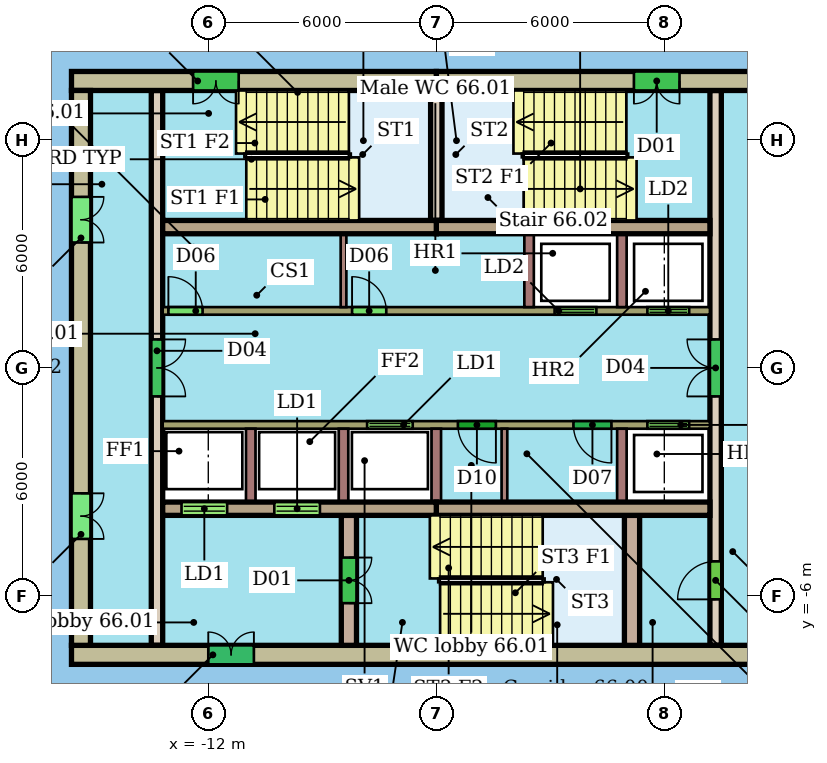
"""IFC4 building model, lengths in metres.
Left out: names, types, materials, properties, quantities, classifications, styles, units other than length and angle.
Written with IfcOpenShell. Run it as: python <this file> out.ifc"""

import sys

from ifc_helpers import new_model, si_unit, direction, frame, frame_2d, origin, place, context, subcontext, project, spatial, rectangle, extrude, element, fill, save


model = new_model("IFC4")
c1 = context("Model", 3, precision=1e-05, world=origin(), true_north=direction((0.0, 1.0)))
c2 = subcontext(c1, "Body", "Model", "MODEL_VIEW")
j1 = project(units=[si_unit("LENGTHUNIT", "METRE"), si_unit("PLANEANGLEUNIT", "RADIAN")], contexts=[c1])
p1 = place(None, origin())
s1 = spatial("IfcSite", under=j1, at=p1, CompositionType="ELEMENT")
p2 = place(p1, origin())
s2 = spatial("IfcBuilding", under=s1, at=p2, CompositionType="ELEMENT")
p3 = place(p2, frame((0.0, 0.0, 268.5)))
s3 = spatial("IfcBuildingStorey", under=s2, at=p3, CompositionType="ELEMENT", Elevation=268.5)
p4 = place(p3, frame((3.6, 7.55, 0.0), z_axis=(0.0, 0.0, 1.0), x_axis=(-1.0, 0.0, 0.0)))
e1 = element("IfcWall", 1, at=p4, inside=s3, PredefinedType="SHEAR", context=c2, shape_type="SweptSolid", body=[
    extrude(rectangle(XDim=9.6, YDim=0.5, at=frame_2d((4.8, 0.0))), origin(), (0.0, 0.0, 1.0), 3.3),
])
p5 = place(p4, frame((3.2, 0.0, 0.0)))
e2 = element("IfcOpeningElement", 2, at=p5, cuts=e1, PredefinedType="OPENING", context=c2, shape_type="SweptSolid", body=[
    extrude(rectangle(XDim=1.2, YDim=2.1, at=frame_2d((0.6, 1.05))), frame((0.0, 0.26, 0.0), z_axis=(0.0, -1.0, 0.0), x_axis=(1.0, 0.0, 0.0)), (0.0, 0.0, 1.0), 0.52),
])
p6 = place(p3, frame((-6.0, 7.55, 0.0), z_axis=(0.0, 0.0, 1.0), x_axis=(-1.0, 0.0, 0.0)))
e3 = element("IfcWall", 3, at=p6, inside=s3, PredefinedType="SHEAR", context=c2, shape_type="SweptSolid", body=[
    extrude(rectangle(XDim=9.6, YDim=0.5, at=frame_2d((4.8, 0.0))), origin(), (0.0, 0.0, 1.0), 3.3),
])
p7 = place(p6, frame((5.2, 0.0, 0.0)))
e4 = element("IfcOpeningElement", 4, at=p7, cuts=e3, PredefinedType="OPENING", context=c2, shape_type="SweptSolid", body=[
    extrude(rectangle(XDim=1.2, YDim=2.1, at=frame_2d((0.6, 1.05))), frame((0.0, 0.26, 0.0), z_axis=(0.0, -1.0, 0.0), x_axis=(1.0, 0.0, 0.0)), (0.0, 0.0, 1.0), 0.52),
])
p8 = place(p3, frame((-15.6, -7.55, 0.0), z_axis=(0.0, 0.0, 1.0), x_axis=(1.0, 0.0, 0.0)))
e5 = element("IfcWall", 5, at=p8, inside=s3, PredefinedType="SHEAR", context=c2, shape_type="SweptSolid", body=[
    extrude(rectangle(XDim=19.2, YDim=0.5, at=frame_2d((9.6, 0.0))), origin(), (0.0, 0.0, 1.0), 3.3),
])
p9 = place(p8, frame((3.6, 0.0, 0.0)))
e6 = element("IfcOpeningElement", 6, at=p9, cuts=e5, PredefinedType="OPENING", context=c2, shape_type="SweptSolid", body=[
    extrude(rectangle(XDim=1.2, YDim=2.1, at=frame_2d((0.6, 1.05))), frame((0.0, 0.26, 0.0), z_axis=(0.0, -1.0, 0.0), x_axis=(1.0, 0.0, 0.0)), (0.0, 0.0, 1.0), 0.52),
])
p10 = place(p3, frame((-15.35, 7.3, 0.0), z_axis=(0.0, 0.0, 1.0), x_axis=(0.0, -1.0, 0.0)))
e7 = element("IfcWall", 7, at=p10, inside=s3, PredefinedType="SHEAR", context=c2, shape_type="SweptSolid", body=[
    extrude(rectangle(XDim=14.6, YDim=0.5, at=frame_2d((7.3, 0.0))), origin(), (0.0, 0.0, 1.0), 3.3),
])
p11 = place(p10, frame((10.6, 0.0, 0.0)))
e8 = element("IfcOpeningElement", 8, at=p11, cuts=e7, PredefinedType="OPENING", context=c2, shape_type="SweptSolid", body=[
    extrude(rectangle(XDim=1.2, YDim=2.1, at=frame_2d((0.6, 1.05))), frame((0.0, 0.26, 0.0), z_axis=(0.0, -1.0, 0.0), x_axis=(1.0, 0.0, 0.0)), (0.0, 0.0, 1.0), 0.52),
])
p12 = place(p10, frame((2.8, 0.0, 0.0)))
e9 = element("IfcOpeningElement", 9, at=p12, cuts=e7, PredefinedType="OPENING", context=c2, shape_type="SweptSolid", body=[
    extrude(rectangle(XDim=1.2, YDim=2.1, at=frame_2d((0.6, 1.05))), frame((0.0, 0.26, 0.0), z_axis=(0.0, -1.0, 0.0), x_axis=(1.0, 0.0, 0.0)), (0.0, 0.0, 1.0), 0.52),
])
for number, where, z_axis, x_axis in (
    (10, (-13.2, 3.705, 0.0), (0.0, 0.0, 1.0), (1.0, 0.0, 0.0)),
    (11, (-6.0, 3.705, 0.0), (0.0, 0.0, 1.0), (1.0, 0.0, 0.0)),
):
    element("IfcWall", number, at=place(p3, frame(where, z_axis=z_axis, x_axis=x_axis)), inside=s3, PredefinedType="SHEAR", context=c2, shape_type="SweptSolid", body=[
        extrude(rectangle(XDim=7.2, YDim=0.35, at=frame_2d((3.6, 0.0))), origin(), (0.0, 0.0, 1.0), 3.3),
    ])
p13 = place(p3, frame((-13.2, -3.705, 0.0), z_axis=(0.0, 0.0, 1.0), x_axis=(1.0, 0.0, 0.0)))
e12 = element("IfcWall", 12, at=p13, inside=s3, PredefinedType="SHEAR", context=c2, shape_type="SweptSolid", body=[
    extrude(rectangle(XDim=7.2, YDim=0.35, at=frame_2d((3.6, 0.0))), origin(), (0.0, 0.0, 1.0), 3.3),
])
p14 = place(p13, frame((0.496, 0.0, 0.0)))
e13 = element("IfcOpeningElement", 13, at=p14, cuts=e12, PredefinedType="OPENING", context=c2, shape_type="SweptSolid", body=[
    extrude(rectangle(XDim=1.2, YDim=2.1, at=frame_2d((0.6, 1.05))), frame((0.0, 0.185, 0.0), z_axis=(0.0, -1.0, 0.0), x_axis=(1.0, 0.0, 0.0)), (0.0, 0.0, 1.0), 0.37),
])
p15 = place(p13, frame((2.938, 0.0, 0.0)))
e14 = element("IfcOpeningElement", 14, at=p15, cuts=e12, PredefinedType="OPENING", context=c2, shape_type="SweptSolid", body=[
    extrude(rectangle(XDim=1.2, YDim=2.1, at=frame_2d((0.6, 1.05))), frame((0.0, 0.185, 0.0), z_axis=(0.0, -1.0, 0.0), x_axis=(1.0, 0.0, 0.0)), (0.0, 0.0, 1.0), 0.37),
])
p16 = place(p3, frame((-6.0, -3.705, 0.0), z_axis=(0.0, 0.0, 1.0), x_axis=(1.0, 0.0, 0.0)))
e15 = element("IfcWall", 15, at=p16, inside=s3, PredefinedType="SHEAR", context=c2, shape_type="SweptSolid", body=[
    extrude(rectangle(XDim=7.2, YDim=0.35, at=frame_2d((3.6, 0.0))), origin(), (0.0, 0.0, 1.0), 3.3),
])
p17 = place(p3, frame((-13.35, 7.3, 0.0), z_axis=(0.0, 0.0, 1.0), x_axis=(0.0, -1.0, 0.0)))
e16 = element("IfcWall", 16, at=p17, inside=s3, PredefinedType="SHEAR", context=c2, shape_type="SweptSolid", body=[
    extrude(rectangle(XDim=14.6, YDim=0.3, at=frame_2d((7.3, 0.0))), origin(), (0.0, 0.0, 1.0), 3.3),
])
p18 = place(p17, frame((6.55, 0.0, 0.0)))
e17 = element("IfcOpeningElement", 17, at=p18, cuts=e16, PredefinedType="OPENING", context=c2, shape_type="SweptSolid", body=[
    extrude(rectangle(XDim=1.5, YDim=2.1, at=frame_2d((0.75, 1.05))), frame((0.0, 0.16, 0.0), z_axis=(0.0, -1.0, 0.0), x_axis=(1.0, 0.0, 0.0)), (0.0, 0.0, 1.0), 0.32),
])
p19 = place(p3, frame((1.35, -7.3, 0.0), z_axis=(0.0, 0.0, 1.0), x_axis=(0.0, 1.0, 0.0)))
e18 = element("IfcWall", 18, at=p19, inside=s3, PredefinedType="SHEAR", context=c2, shape_type="SweptSolid", body=[
    extrude(rectangle(XDim=14.6, YDim=0.3, at=frame_2d((7.3, 0.0))), origin(), (0.0, 0.0, 1.0), 3.3),
])
p20 = place(p19, frame((1.21, 0.0, 0.0)))
e19 = element("IfcOpeningElement", 19, at=p20, cuts=e18, PredefinedType="OPENING", context=c2, shape_type="SweptSolid", body=[
    extrude(rectangle(XDim=1.0, YDim=2.1, at=frame_2d((0.5, 1.05))), frame((0.0, 0.16, 0.0), z_axis=(0.0, -1.0, 0.0), x_axis=(1.0, 0.0, 0.0)), (0.0, 0.0, 1.0), 0.32),
])
p21 = place(p19, frame((6.55, 0.0, 0.0)))
e20 = element("IfcOpeningElement", 20, at=p21, cuts=e18, PredefinedType="OPENING", context=c2, shape_type="SweptSolid", body=[
    extrude(rectangle(XDim=1.5, YDim=2.1, at=frame_2d((0.75, 1.05))), frame((0.0, 0.16, 0.0), z_axis=(0.0, -1.0, 0.0), x_axis=(1.0, 0.0, 0.0)), (0.0, 0.0, 1.0), 0.32),
])
p22 = place(p3, frame((-13.2, 1.5, 0.0), z_axis=(0.0, 0.0, 1.0), x_axis=(1.0, 0.0, 0.0)))
e21 = element("IfcWall", 21, at=p22, inside=s3, PredefinedType="SHEAR", context=c2, shape_type="SweptSolid", body=[
    extrude(rectangle(XDim=14.4, YDim=0.2, at=frame_2d((7.2, 0.0))), origin(), (0.0, 0.0, 1.0), 3.3),
])
p23 = place(p22, frame((10.312, 0.0, 0.0)))
e22 = element("IfcOpeningElement", 22, at=p23, cuts=e21, PredefinedType="OPENING", context=c2, shape_type="SweptSolid", body=[
    extrude(rectangle(XDim=1.1, YDim=2.1, at=frame_2d((0.55, 1.05))), frame((0.0, 0.11, 0.0), z_axis=(0.0, -1.0, 0.0), x_axis=(1.0, 0.0, 0.0)), (0.0, 0.0, 1.0), 0.22),
])
p24 = place(p22, frame((12.754, 0.0, 0.0)))
e23 = element("IfcOpeningElement", 23, at=p24, cuts=e21, PredefinedType="OPENING", context=c2, shape_type="SweptSolid", body=[
    extrude(rectangle(XDim=1.1, YDim=2.1, at=frame_2d((0.55, 1.05))), frame((0.0, 0.11, 0.0), z_axis=(0.0, -1.0, 0.0), x_axis=(1.0, 0.0, 0.0)), (0.0, 0.0, 1.0), 0.22),
])
p25 = place(p22, frame((0.15, 0.0, 0.0)))
e24 = element("IfcOpeningElement", 24, at=p25, cuts=e21, PredefinedType="OPENING", context=c2, shape_type="SweptSolid", body=[
    extrude(rectangle(XDim=0.9, YDim=2.1, at=frame_2d((0.45, 1.05))), frame((0.0, 0.11, 0.0), z_axis=(0.0, -1.0, 0.0), x_axis=(1.0, 0.0, 0.0)), (0.0, 0.0, 1.0), 0.22),
])
p26 = place(p22, frame((4.983, 0.0, 0.0)))
e25 = element("IfcOpeningElement", 25, at=p26, cuts=e21, PredefinedType="OPENING", context=c2, shape_type="SweptSolid", body=[
    extrude(rectangle(XDim=0.9, YDim=2.1, at=frame_2d((0.45, 1.05))), frame((0.0, 0.11, 0.0), z_axis=(0.0, -1.0, 0.0), x_axis=(1.0, 0.0, 0.0)), (0.0, 0.0, 1.0), 0.22),
])
p27 = place(p3, frame((1.2, -1.5, 0.0), z_axis=(0.0, 0.0, 1.0), x_axis=(-1.0, 0.0, 0.0)))
e26 = element("IfcWall", 26, at=p27, inside=s3, PredefinedType="SHEAR", context=c2, shape_type="SweptSolid", body=[
    extrude(rectangle(XDim=14.4, YDim=0.2, at=frame_2d((7.2, 0.0))), origin(), (0.0, 0.0, 1.0), 3.3),
])
p28 = place(p27, frame((7.821, 0.0, 0.0)))
e27 = element("IfcOpeningElement", 27, at=p28, cuts=e26, PredefinedType="OPENING", context=c2, shape_type="SweptSolid", body=[
    extrude(rectangle(XDim=1.2, YDim=2.1, at=frame_2d((0.6, 1.05))), frame((0.0, 0.11, 0.0), z_axis=(0.0, -1.0, 0.0), x_axis=(1.0, 0.0, 0.0)), (0.0, 0.0, 1.0), 0.22),
])
p29 = place(p27, frame((0.546, 0.0, 0.0)))
e28 = element("IfcOpeningElement", 28, at=p29, cuts=e26, PredefinedType="OPENING", context=c2, shape_type="SweptSolid", body=[
    extrude(rectangle(XDim=1.1, YDim=2.1, at=frame_2d((0.55, 1.05))), frame((0.0, 0.11, 0.0), z_axis=(0.0, -1.0, 0.0), x_axis=(1.0, 0.0, 0.0)), (0.0, 0.0, 1.0), 0.22),
])
p30 = place(p27, frame((5.632, 0.0, 0.0)))
e29 = element("IfcOpeningElement", 29, at=p30, cuts=e26, PredefinedType="OPENING", context=c2, shape_type="SweptSolid", body=[
    extrude(rectangle(XDim=1.0, YDim=2.1, at=frame_2d((0.5, 1.05))), frame((0.0, 0.11, 0.0), z_axis=(0.0, -1.0, 0.0), x_axis=(1.0, 0.0, 0.0)), (0.0, 0.0, 1.0), 0.22),
])
p31 = place(p27, frame((2.592, 0.0, 0.0)))
e30 = element("IfcOpeningElement", 30, at=p31, cuts=e26, PredefinedType="OPENING", context=c2, shape_type="SweptSolid", body=[
    extrude(rectangle(XDim=1.0, YDim=2.1, at=frame_2d((0.5, 1.05))), frame((0.0, 0.11, 0.0), z_axis=(0.0, -1.0, 0.0), x_axis=(1.0, 0.0, 0.0)), (0.0, 0.0, 1.0), 0.22),
])
p32 = place(p3, frame((-8.3, -3.88, 0.0), z_axis=(0.0, 0.0, 1.0), x_axis=(0.0, -1.0, 0.0)))
e31 = element("IfcWall", 31, at=p32, inside=s3, PredefinedType="SHEAR", context=c2, shape_type="SweptSolid", body=[
    extrude(rectangle(XDim=3.42, YDim=0.4, at=frame_2d((1.71, 0.0))), origin(), (0.0, 0.0, 1.0), 3.3),
])
p33 = place(p32, frame((1.11, 0.0, 0.0)))
e32 = element("IfcOpeningElement", 32, at=p33, cuts=e31, PredefinedType="OPENING", context=c2, shape_type="SweptSolid", body=[
    extrude(rectangle(XDim=1.2, YDim=2.1, at=frame_2d((0.6, 1.05))), frame((0.0, 0.21, 0.0), z_axis=(0.0, -1.0, 0.0), x_axis=(1.0, 0.0, 0.0)), (0.0, 0.0, 1.0), 0.42),
])
p34 = place(p3, frame((-0.85, -3.88, 0.0), z_axis=(0.0, 0.0, 1.0), x_axis=(0.0, -1.0, 0.0)))
e33 = element("IfcWall", 33, at=p34, inside=s3, PredefinedType="SHEAR", context=c2, shape_type="SweptSolid", body=[
    extrude(rectangle(XDim=3.42, YDim=0.4, at=frame_2d((1.71, 0.0))), origin(), (0.0, 0.0, 1.0), 3.3),
])
p35 = place(p3, frame((-6.0, 3.88, 0.0), z_axis=(0.0, 0.0, 1.0), x_axis=(0.0, 1.0, 0.0)))
e34 = element("IfcWall", 34, at=p35, inside=s3, PredefinedType="SHEAR", context=c2, shape_type="SweptSolid", body=[
    extrude(rectangle(XDim=3.42, YDim=0.3, at=frame_2d((1.71, 0.0))), origin(), (0.0, 0.0, 1.0), 3.3),
])
for number, where, z_axis, x_axis in (
    (35, (-3.558, 1.6, 0.0), (0.0, 0.0, 1.0), (0.0, 1.0, 0.0)),
    (36, (-1.117, 1.6, 0.0), (0.0, 0.0, 1.0), (0.0, 1.0, 0.0)),
):
    element("IfcWall", number, at=place(p3, frame(where, z_axis=z_axis, x_axis=x_axis)), inside=s3, PredefinedType="SHEAR", context=c2, shape_type="SweptSolid", body=[
        extrude(rectangle(XDim=1.93, YDim=0.25, at=frame_2d((0.965, 0.0))), origin(), (0.0, 0.0, 1.0), 3.3),
    ])
p36 = place(p3, frame((-8.442, 1.6, 0.0), z_axis=(0.0, 0.0, 1.0), x_axis=(0.0, 1.0, 0.0)))
e37 = element("IfcWall", 37, at=p36, inside=s3, PredefinedType="PARTITIONING", context=c2, shape_type="SweptSolid", body=[
    extrude(rectangle(XDim=1.93, YDim=0.15, at=frame_2d((0.965, 0.0))), origin(), (0.0, 0.0, 1.0), 3.3),
])
for number, where, z_axis, x_axis in (
    (38, (-10.883, -1.6, 0.0), (0.0, 0.0, 1.0), (0.0, -1.0, 0.0)),
    (39, (-8.442, -1.6, 0.0), (0.0, 0.0, 1.0), (0.0, -1.0, 0.0)),
    (40, (-6.0, -1.6, 0.0), (0.0, 0.0, 1.0), (0.0, -1.0, 0.0)),
    (41, (-1.117, -1.6, 0.0), (0.0, 0.0, 1.0), (0.0, -1.0, 0.0)),
):
    element("IfcWall", number, at=place(p3, frame(where, z_axis=z_axis, x_axis=x_axis)), inside=s3, PredefinedType="SHEAR", context=c2, shape_type="SweptSolid", body=[
        extrude(rectangle(XDim=1.93, YDim=0.25, at=frame_2d((0.965, 0.0))), origin(), (0.0, 0.0, 1.0), 3.3),
    ])
p37 = place(p3, frame((-4.207, -1.6, 0.0), z_axis=(0.0, 0.0, 1.0), x_axis=(0.0, -1.0, 0.0)))
e42 = element("IfcWall", 42, at=p37, inside=s3, PredefinedType="PARTITIONING", context=c2, shape_type="SweptSolid", body=[
    extrude(rectangle(XDim=1.93, YDim=0.15, at=frame_2d((0.965, 0.0))), origin(), (0.0, 0.0, 1.0), 3.3),
])
p38 = place(p5, origin())
e43 = element("IfcDoor", 43, at=p38, inside=s3, OperationType="DOUBLE_DOOR_SINGLE_SWING", PredefinedType="NOTDEFINED", context=c2, shape_type="SweptSolid", body=[
    extrude(rectangle(XDim=1.2, YDim=2.1, at=frame_2d((0.6, 1.05))), frame((0.0, 0.025, 0.0), z_axis=(0.0, -1.0, 0.0), x_axis=(1.0, 0.0, 0.0)), (0.0, 0.0, 1.0), 0.05),
])
fill(e2, e43)
p39 = place(p7, origin())
e44 = element("IfcDoor", 44, at=p39, inside=s3, OperationType="DOUBLE_DOOR_SINGLE_SWING", PredefinedType="NOTDEFINED", context=c2, shape_type="SweptSolid", body=[
    extrude(rectangle(XDim=1.2, YDim=2.1, at=frame_2d((0.6, 1.05))), frame((0.0, 0.025, 0.0), z_axis=(0.0, -1.0, 0.0), x_axis=(1.0, 0.0, 0.0)), (0.0, 0.0, 1.0), 0.05),
])
fill(e4, e44)
p40 = place(p9, origin())
e45 = element("IfcDoor", 45, at=p40, inside=s3, OperationType="DOUBLE_DOOR_SINGLE_SWING", PredefinedType="NOTDEFINED", context=c2, shape_type="SweptSolid", body=[
    extrude(rectangle(XDim=1.2, YDim=2.1, at=frame_2d((0.6, 1.05))), frame((0.0, 0.025, 0.0), z_axis=(0.0, -1.0, 0.0), x_axis=(1.0, 0.0, 0.0)), (0.0, 0.0, 1.0), 0.05),
])
fill(e6, e45)
p41 = place(p11, origin())
e46 = element("IfcDoor", 46, at=p41, inside=s3, OperationType="DOUBLE_DOOR_SINGLE_SWING", PredefinedType="NOTDEFINED", context=c2, shape_type="SweptSolid", body=[
    extrude(rectangle(XDim=1.2, YDim=2.1, at=frame_2d((0.6, 1.05))), frame((0.0, 0.025, 0.0), z_axis=(0.0, -1.0, 0.0), x_axis=(1.0, 0.0, 0.0)), (0.0, 0.0, 1.0), 0.05),
])
fill(e8, e46)
p42 = place(p12, origin())
e47 = element("IfcDoor", 47, at=p42, inside=s3, OperationType="DOUBLE_DOOR_SINGLE_SWING", PredefinedType="NOTDEFINED", context=c2, shape_type="SweptSolid", body=[
    extrude(rectangle(XDim=1.2, YDim=2.1, at=frame_2d((0.6, 1.05))), frame((0.0, 0.025, 0.0), z_axis=(0.0, -1.0, 0.0), x_axis=(1.0, 0.0, 0.0)), (0.0, 0.0, 1.0), 0.05),
])
fill(e9, e47)
p43 = place(p14, origin())
e48 = element("IfcDoor", 48, at=p43, inside=s3, OperationType="DOUBLE_DOOR_SLIDING", PredefinedType="NOTDEFINED", context=c2, shape_type="SweptSolid", body=[
    extrude(rectangle(XDim=1.2, YDim=2.1, at=frame_2d((0.6, 1.05))), frame((0.0, 0.025, 0.0), z_axis=(0.0, -1.0, 0.0), x_axis=(1.0, 0.0, 0.0)), (0.0, 0.0, 1.0), 0.05),
])
fill(e13, e48)
p44 = place(p15, origin())
e49 = element("IfcDoor", 49, at=p44, inside=s3, OperationType="DOUBLE_DOOR_SLIDING", PredefinedType="NOTDEFINED", context=c2, shape_type="SweptSolid", body=[
    extrude(rectangle(XDim=1.2, YDim=2.1, at=frame_2d((0.6, 1.05))), frame((0.0, 0.025, 0.0), z_axis=(0.0, -1.0, 0.0), x_axis=(1.0, 0.0, 0.0)), (0.0, 0.0, 1.0), 0.05),
])
fill(e14, e49)
p45 = place(p18, origin())
e50 = element("IfcDoor", 50, at=p45, inside=s3, OperationType="DOUBLE_DOOR_SINGLE_SWING", PredefinedType="NOTDEFINED", context=c2, shape_type="SweptSolid", body=[
    extrude(rectangle(XDim=1.5, YDim=2.1, at=frame_2d((0.75, 1.05))), frame((0.0, 0.025, 0.0), z_axis=(0.0, -1.0, 0.0), x_axis=(1.0, 0.0, 0.0)), (0.0, 0.0, 1.0), 0.05),
])
fill(e17, e50)
p46 = place(p20, origin())
e51 = element("IfcDoor", 51, at=p46, inside=s3, OperationType="SINGLE_SWING_LEFT", PredefinedType="NOTDEFINED", context=c2, shape_type="SweptSolid", body=[
    extrude(rectangle(XDim=1.0, YDim=2.1, at=frame_2d((0.5, 1.05))), frame((0.0, 0.025, 0.0), z_axis=(0.0, -1.0, 0.0), x_axis=(1.0, 0.0, 0.0)), (0.0, 0.0, 1.0), 0.05),
])
fill(e19, e51)
p47 = place(p21, origin())
e52 = element("IfcDoor", 52, at=p47, inside=s3, OperationType="DOUBLE_DOOR_SINGLE_SWING", PredefinedType="NOTDEFINED", context=c2, shape_type="SweptSolid", body=[
    extrude(rectangle(XDim=1.5, YDim=2.1, at=frame_2d((0.75, 1.05))), frame((0.0, 0.025, 0.0), z_axis=(0.0, -1.0, 0.0), x_axis=(1.0, 0.0, 0.0)), (0.0, 0.0, 1.0), 0.05),
])
fill(e20, e52)
p48 = place(p23, origin())
e53 = element("IfcDoor", 53, at=p48, inside=s3, OperationType="DOUBLE_DOOR_SLIDING", PredefinedType="NOTDEFINED", context=c2, shape_type="SweptSolid", body=[
    extrude(rectangle(XDim=1.1, YDim=2.1, at=frame_2d((0.55, 1.05))), frame((0.0, 0.025, 0.0), z_axis=(0.0, -1.0, 0.0), x_axis=(1.0, 0.0, 0.0)), (0.0, 0.0, 1.0), 0.05),
])
fill(e22, e53)
p49 = place(p24, origin())
e54 = element("IfcDoor", 54, at=p49, inside=s3, OperationType="DOUBLE_DOOR_SLIDING", PredefinedType="NOTDEFINED", context=c2, shape_type="SweptSolid", body=[
    extrude(rectangle(XDim=1.1, YDim=2.1, at=frame_2d((0.55, 1.05))), frame((0.0, 0.025, 0.0), z_axis=(0.0, -1.0, 0.0), x_axis=(1.0, 0.0, 0.0)), (0.0, 0.0, 1.0), 0.05),
])
fill(e23, e54)
p50 = place(p25, origin())
e55 = element("IfcDoor", 55, at=p50, inside=s3, OperationType="SINGLE_SWING_LEFT", PredefinedType="NOTDEFINED", context=c2, shape_type="SweptSolid", body=[
    extrude(rectangle(XDim=0.9, YDim=2.1, at=frame_2d((0.45, 1.05))), frame((0.0, 0.025, 0.0), z_axis=(0.0, -1.0, 0.0), x_axis=(1.0, 0.0, 0.0)), (0.0, 0.0, 1.0), 0.05),
])
fill(e24, e55)
p51 = place(p26, origin())
e56 = element("IfcDoor", 56, at=p51, inside=s3, OperationType="SINGLE_SWING_LEFT", PredefinedType="NOTDEFINED", context=c2, shape_type="SweptSolid", body=[
    extrude(rectangle(XDim=0.9, YDim=2.1, at=frame_2d((0.45, 1.05))), frame((0.0, 0.025, 0.0), z_axis=(0.0, -1.0, 0.0), x_axis=(1.0, 0.0, 0.0)), (0.0, 0.0, 1.0), 0.05),
])
fill(e25, e56)
p52 = place(p28, origin())
e57 = element("IfcDoor", 57, at=p52, inside=s3, OperationType="DOUBLE_DOOR_SLIDING", PredefinedType="NOTDEFINED", context=c2, shape_type="SweptSolid", body=[
    extrude(rectangle(XDim=1.2, YDim=2.1, at=frame_2d((0.6, 1.05))), frame((0.0, 0.025, 0.0), z_axis=(0.0, -1.0, 0.0), x_axis=(1.0, 0.0, 0.0)), (0.0, 0.0, 1.0), 0.05),
])
fill(e27, e57)
p53 = place(p29, origin())
e58 = element("IfcDoor", 58, at=p53, inside=s3, OperationType="DOUBLE_DOOR_SLIDING", PredefinedType="NOTDEFINED", context=c2, shape_type="SweptSolid", body=[
    extrude(rectangle(XDim=1.1, YDim=2.1, at=frame_2d((0.55, 1.05))), frame((0.0, 0.025, 0.0), z_axis=(0.0, -1.0, 0.0), x_axis=(1.0, 0.0, 0.0)), (0.0, 0.0, 1.0), 0.05),
])
fill(e28, e58)
p54 = place(p30, origin())
e59 = element("IfcDoor", 59, at=p54, inside=s3, OperationType="SINGLE_SWING_LEFT", PredefinedType="NOTDEFINED", context=c2, shape_type="SweptSolid", body=[
    extrude(rectangle(XDim=1.0, YDim=2.1, at=frame_2d((0.5, 1.05))), frame((0.0, 0.025, 0.0), z_axis=(0.0, -1.0, 0.0), x_axis=(1.0, 0.0, 0.0)), (0.0, 0.0, 1.0), 0.05),
])
fill(e29, e59)
p55 = place(p31, origin())
e60 = element("IfcDoor", 60, at=p55, inside=s3, OperationType="SINGLE_SWING_LEFT", PredefinedType="NOTDEFINED", context=c2, shape_type="SweptSolid", body=[
    extrude(rectangle(XDim=1.0, YDim=2.1, at=frame_2d((0.5, 1.05))), frame((0.0, 0.025, 0.0), z_axis=(0.0, -1.0, 0.0), x_axis=(1.0, 0.0, 0.0)), (0.0, 0.0, 1.0), 0.05),
])
fill(e30, e60)
p56 = place(p33, origin())
e61 = element("IfcDoor", 61, at=p56, inside=s3, OperationType="DOUBLE_DOOR_SINGLE_SWING", PredefinedType="NOTDEFINED", context=c2, shape_type="SweptSolid", body=[
    extrude(rectangle(XDim=1.2, YDim=2.1, at=frame_2d((0.6, 1.05))), frame((0.0, 0.025, 0.0), z_axis=(0.0, -1.0, 0.0), x_axis=(1.0, 0.0, 0.0)), (0.0, 0.0, 1.0), 0.05),
])
fill(e32, e61)
save(model, sys.argv[1])
